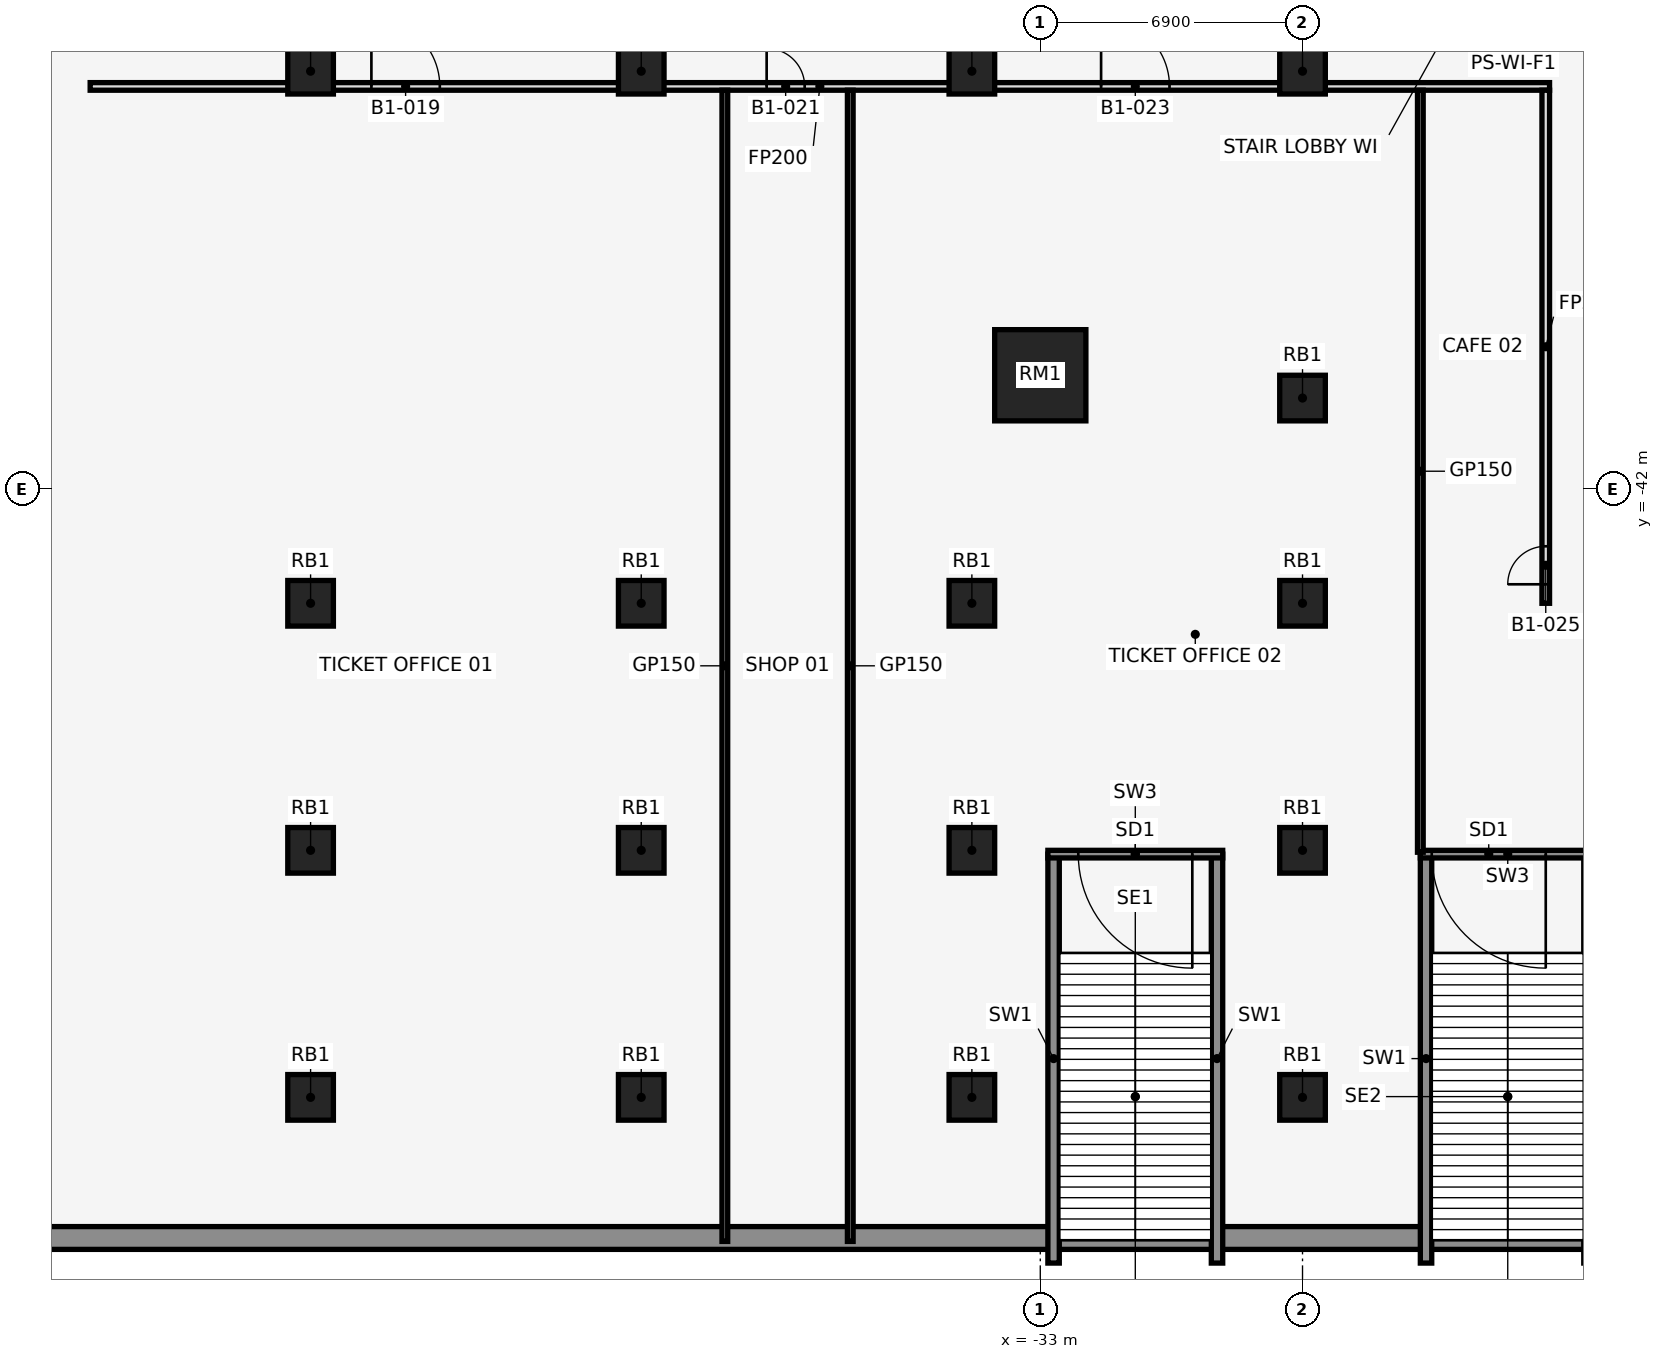
"""IFC4 building model, lengths in metres.
Left out: names, types, materials, properties, quantities, classifications, styles, units other than length and angle.
Written with IfcOpenShell. Run it as: python <this file> out.ifc"""

import sys

from ifc_helpers import new_model, si_unit, direction, frame, frame_2d, origin, origin_2d, place, context, subcontext, project, spatial, polyline, rectangle, outline, extrude, element, fill, save


model = new_model("IFC4")
c1 = context("Model", 3, precision=1e-05, world=origin(), true_north=direction((0.0, 1.0)))
c2 = subcontext(c1, "Body", "Model", "MODEL_VIEW")
j1 = project(units=[si_unit("LENGTHUNIT", "METRE"), si_unit("PLANEANGLEUNIT", "RADIAN")], contexts=[c1])
p1 = place(None, origin())
s1 = spatial("IfcSite", under=j1, at=p1, CompositionType="ELEMENT")
p2 = place(p1, origin())
s2 = spatial("IfcBuilding", under=s1, at=p2, CompositionType="ELEMENT")
p3 = place(p2, frame((0.0, 0.0, -5.0)))
s3 = spatial("IfcBuildingStorey", under=s2, at=p3, CompositionType="ELEMENT", Elevation=-5.0)
p4 = place(p3, frame((-33.0, -39.0, 0.0), z_axis=(0.0, 0.0, 1.0), x_axis=(1.0, 0.0, 0.0)))
e1 = element("IfcColumn", 1, at=p4, inside=s3, PredefinedType="COLUMN", context=c2, shape_type="SweptSolid", body=[
    extrude(rectangle(XDim=2.4, YDim=2.4, at=origin_2d()), origin(), (0.0, 0.0, 1.0), 5.0),
])
for number, where, z_axis, x_axis in (
    (2, (-26.1, -39.6, 0.0), (0.0, 0.0, 1.0), (1.0, 0.0, 0.0)),
    (3, (-52.2, -31.0, 0.0), (0.0, 0.0, 1.0), (1.0, 0.0, 0.0)),
    (4, (-52.2, -45.0, 0.0), (0.0, 0.0, 1.0), (1.0, 0.0, 0.0)),
    (5, (-52.2, -51.5, 0.0), (0.0, 0.0, 1.0), (1.0, 0.0, 0.0)),
    (6, (-52.2, -58.0, 0.0), (0.0, 0.0, 1.0), (1.0, 0.0, 0.0)),
    (7, (-43.5, -31.0, 0.0), (0.0, 0.0, 1.0), (1.0, 0.0, 0.0)),
    (8, (-43.5, -45.0, 0.0), (0.0, 0.0, 1.0), (1.0, 0.0, 0.0)),
    (9, (-43.5, -51.5, 0.0), (0.0, 0.0, 1.0), (1.0, 0.0, 0.0)),
    (10, (-43.5, -58.0, 0.0), (0.0, 0.0, 1.0), (1.0, 0.0, 0.0)),
    (11, (-34.8, -31.0, 0.0), (0.0, 0.0, 1.0), (1.0, 0.0, 0.0)),
    (12, (-34.8, -45.0, 0.0), (0.0, 0.0, 1.0), (1.0, 0.0, 0.0)),
    (13, (-34.8, -51.5, 0.0), (0.0, 0.0, 1.0), (1.0, 0.0, 0.0)),
    (14, (-34.8, -58.0, 0.0), (0.0, 0.0, 1.0), (1.0, 0.0, 0.0)),
    (15, (-26.1, -31.0, 0.0), (0.0, 0.0, 1.0), (1.0, 0.0, 0.0)),
    (16, (-26.1, -45.0, 0.0), (0.0, 0.0, 1.0), (1.0, 0.0, 0.0)),
    (17, (-26.1, -51.5, 0.0), (0.0, 0.0, 1.0), (1.0, 0.0, 0.0)),
    (18, (-26.1, -58.0, 0.0), (0.0, 0.0, 1.0), (1.0, 0.0, 0.0)),
):
    element("IfcColumn", number, at=place(p3, frame(where, z_axis=z_axis, x_axis=x_axis)), inside=s3, PredefinedType="COLUMN", context=c2, shape_type="SweptSolid", body=[
        extrude(rectangle(XDim=1.2, YDim=1.2, at=origin_2d()), origin(), (0.0, 0.0, 1.0), 5.0),
    ])
p5 = place(p3, frame((-60.0, -61.7, 0.0), z_axis=(0.0, 0.0, 1.0), x_axis=(1.0, 0.0, 0.0)))
e19 = element("IfcWall", 19, at=p5, inside=s3, PredefinedType="SOLIDWALL", context=c2, shape_type="SweptSolid", body=[
    extrude(rectangle(XDim=120.0, YDim=0.6, at=frame_2d((60.0, 0.0))), origin(), (0.0, 0.0, 1.0), 5.0),
])
for number, where, z_axis, x_axis in (
    (20, (-32.65, -51.6, 0.0), (0.0, 0.0, 1.0), (0.0, -1.0, 0.0)),
    (21, (-28.35, -51.6, 0.0), (0.0, 0.0, 1.0), (0.0, -1.0, 0.0)),
):
    element("IfcWall", number, at=place(p3, frame(where, z_axis=z_axis, x_axis=x_axis)), inside=s3, PredefinedType="STANDARD", context=c2, shape_type="SweptSolid", body=[
        extrude(outline(polyline([(0.0, 0.0), (10.76, 0.0), (10.76, 6.1), (10.16, 6.1), (2.6, 1.1), (0.0, 1.1), (0.0, 0.0)])), frame((0.0, 0.15, 0.0), z_axis=(0.0, -1.0, 0.0), x_axis=(1.0, 0.0, 0.0)), (0.0, 0.0, 1.0), 0.3),
    ])
p6 = place(p3, frame((-28.2, -51.6, 0.0), z_axis=(0.0, 0.0, 1.0), x_axis=(-1.0, 0.0, 0.0)))
e22 = element("IfcWall", 22, at=p6, inside=s3, PredefinedType="STANDARD", context=c2, shape_type="SweptSolid", body=[
    extrude(rectangle(XDim=4.6, YDim=0.2, at=frame_2d((2.3, 0.0))), origin(), (0.0, 0.0, 1.0), 4.75),
])
p7 = place(p6, frame((0.8, 0.0, 0.0)))
e23 = element("IfcOpeningElement", 23, at=p7, cuts=e22, PredefinedType="OPENING", context=c2, shape_type="SweptSolid", body=[
    extrude(rectangle(XDim=3.0, YDim=2.4, at=frame_2d((1.5, 1.2))), frame((0.0, 0.112, 0.0), z_axis=(0.0, -1.0, 0.0), x_axis=(1.0, 0.0, 0.0)), (0.0, 0.0, 1.0), 0.224),
])
for number, where, z_axis, x_axis in (
    (24, (-22.85, -51.6, 0.0), (0.0, 0.0, 1.0), (0.0, -1.0, 0.0)),
    (25, (-18.55, -51.6, 0.0), (0.0, 0.0, 1.0), (0.0, -1.0, 0.0)),
):
    element("IfcWall", number, at=place(p3, frame(where, z_axis=z_axis, x_axis=x_axis)), inside=s3, PredefinedType="STANDARD", context=c2, shape_type="SweptSolid", body=[
        extrude(outline(polyline([(0.0, 0.0), (10.76, 0.0), (10.76, 6.1), (10.16, 6.1), (2.6, 1.1), (0.0, 1.1), (0.0, 0.0)])), frame((0.0, 0.15, 0.0), z_axis=(0.0, -1.0, 0.0), x_axis=(1.0, 0.0, 0.0)), (0.0, 0.0, 1.0), 0.3),
    ])
p8 = place(p3, frame((-18.4, -51.6, 0.0), z_axis=(0.0, 0.0, 1.0), x_axis=(-1.0, 0.0, 0.0)))
e26 = element("IfcWall", 26, at=p8, inside=s3, PredefinedType="STANDARD", context=c2, shape_type="SweptSolid", body=[
    extrude(rectangle(XDim=4.6, YDim=0.2, at=frame_2d((2.3, 0.0))), origin(), (0.0, 0.0, 1.0), 4.75),
])
p9 = place(p8, frame((1.3, 0.0, 0.0)))
e27 = element("IfcOpeningElement", 27, at=p9, cuts=e26, PredefinedType="OPENING", context=c2, shape_type="SweptSolid", body=[
    extrude(rectangle(XDim=3.0, YDim=2.4, at=frame_2d((1.5, 1.2))), frame((0.0, 0.112, 0.0), z_axis=(0.0, -1.0, 0.0), x_axis=(1.0, 0.0, 0.0)), (0.0, 0.0, 1.0), 0.224),
])
p10 = place(p3, frame((-58.0, -31.4, 0.0), z_axis=(0.0, 0.0, 1.0), x_axis=(1.0, 0.0, 0.0)))
e28 = element("IfcWall", 28, at=p10, inside=s3, PredefinedType="PARTITIONING", context=c2, shape_type="SweptSolid", body=[
    extrude(rectangle(XDim=38.4, YDim=0.2, at=frame_2d((19.2, 0.0))), origin(), (0.0, 0.0, 1.0), 4.7),
])
p11 = place(p10, frame((7.4, 0.0, 0.0)))
e29 = element("IfcOpeningElement", 29, at=p11, cuts=e28, PredefinedType="OPENING", context=c2, shape_type="SweptSolid", body=[
    extrude(rectangle(XDim=1.8, YDim=2.1, at=frame_2d((0.9, 1.05))), frame((0.0, 0.112, 0.0), z_axis=(0.0, -1.0, 0.0), x_axis=(1.0, 0.0, 0.0)), (0.0, 0.0, 1.0), 0.224),
])
p12 = place(p10, frame((17.8, 0.0, 0.0)))
e30 = element("IfcOpeningElement", 30, at=p12, cuts=e28, PredefinedType="OPENING", context=c2, shape_type="SweptSolid", body=[
    extrude(rectangle(XDim=1.0, YDim=2.1, at=frame_2d((0.5, 1.05))), frame((0.0, 0.112, 0.0), z_axis=(0.0, -1.0, 0.0), x_axis=(1.0, 0.0, 0.0)), (0.0, 0.0, 1.0), 0.224),
])
p13 = place(p10, frame((26.6, 0.0, 0.0)))
e31 = element("IfcOpeningElement", 31, at=p13, cuts=e28, PredefinedType="OPENING", context=c2, shape_type="SweptSolid", body=[
    extrude(rectangle(XDim=1.8, YDim=2.1, at=frame_2d((0.9, 1.05))), frame((0.0, 0.112, 0.0), z_axis=(0.0, -1.0, 0.0), x_axis=(1.0, 0.0, 0.0)), (0.0, 0.0, 1.0), 0.224),
])
for number, where, z_axis, x_axis in (
    (32, (-41.3, -61.79, 0.0), (0.0, 0.0, 1.0), (0.0, 1.0, 0.0)),
    (33, (-38.0, -61.79, 0.0), (0.0, 0.0, 1.0), (0.0, 1.0, 0.0)),
):
    element("IfcWall", number, at=place(p3, frame(where, z_axis=z_axis, x_axis=x_axis)), inside=s3, PredefinedType="PARTITIONING", context=c2, shape_type="SweptSolid", body=[
        extrude(rectangle(XDim=30.29, YDim=0.15, at=frame_2d((15.145, 0.0))), origin(), (0.0, 0.0, 1.0), 4.7),
    ])
p14 = place(p3, frame((-23.0, -51.55, 0.0), z_axis=(0.0, 0.0, 1.0), x_axis=(0.0, 1.0, 0.0)))
e34 = element("IfcWall", 34, at=p14, inside=s3, PredefinedType="PARTITIONING", context=c2, shape_type="SweptSolid", body=[
    extrude(rectangle(XDim=20.05, YDim=0.15, at=frame_2d((10.025, 0.0))), origin(), (0.0, 0.0, 1.0), 4.7),
])
p15 = place(p3, frame((-19.7, -45.0, 0.0), z_axis=(0.0, 0.0, 1.0), x_axis=(0.0, 1.0, 0.0)))
e35 = element("IfcWall", 35, at=p15, inside=s3, PredefinedType="PARTITIONING", context=c2, shape_type="SweptSolid", body=[
    extrude(rectangle(XDim=13.5, YDim=0.2, at=frame_2d((6.75, 0.0))), origin(), (0.0, 0.0, 1.0), 4.7),
])
p16 = place(p15, frame((0.5, 0.0, 0.0)))
e36 = element("IfcOpeningElement", 36, at=p16, cuts=e35, PredefinedType="OPENING", context=c2, shape_type="SweptSolid", body=[
    extrude(rectangle(XDim=1.0, YDim=2.1, at=frame_2d((0.5, 1.05))), frame((0.0, 0.112, 0.0), z_axis=(0.0, -1.0, 0.0), x_axis=(1.0, 0.0, 0.0)), (0.0, 0.0, 1.0), 0.224),
])
p17 = place(p7, origin())
e37 = element("IfcDoor", 37, at=p17, inside=s3, OperationType="SINGLE_SWING_LEFT", PredefinedType="DOOR", context=c2, shape_type="SweptSolid", body=[
    extrude(rectangle(XDim=3.0, YDim=2.4, at=frame_2d((1.5, 1.2))), frame((0.0, 0.025, 0.0), z_axis=(0.0, -1.0, 0.0), x_axis=(1.0, 0.0, 0.0)), (0.0, 0.0, 1.0), 0.05),
])
fill(e23, e37)
p18 = place(p9, origin())
e38 = element("IfcDoor", 38, at=p18, inside=s3, OperationType="SINGLE_SWING_LEFT", PredefinedType="DOOR", context=c2, shape_type="SweptSolid", body=[
    extrude(rectangle(XDim=3.0, YDim=2.4, at=frame_2d((1.5, 1.2))), frame((0.0, 0.025, 0.0), z_axis=(0.0, -1.0, 0.0), x_axis=(1.0, 0.0, 0.0)), (0.0, 0.0, 1.0), 0.05),
])
fill(e27, e38)
p19 = place(p11, origin())
e39 = element("IfcDoor", 39, at=p19, inside=s3, OperationType="SINGLE_SWING_LEFT", PredefinedType="DOOR", context=c2, shape_type="SweptSolid", body=[
    extrude(rectangle(XDim=1.8, YDim=2.1, at=frame_2d((0.9, 1.05))), frame((0.0, 0.025, 0.0), z_axis=(0.0, -1.0, 0.0), x_axis=(1.0, 0.0, 0.0)), (0.0, 0.0, 1.0), 0.05),
])
fill(e29, e39)
p20 = place(p12, frame((1.0, 0.0, 0.0), z_axis=(0.0, 0.0, 1.0), x_axis=(-1.0, 0.0, 0.0)))
e40 = element("IfcDoor", 40, at=p20, inside=s3, OperationType="SINGLE_SWING_RIGHT", PredefinedType="DOOR", context=c2, shape_type="SweptSolid", body=[
    extrude(rectangle(XDim=1.0, YDim=2.1, at=frame_2d((0.5, 1.05))), frame((0.0, 0.025, 0.0), z_axis=(0.0, -1.0, 0.0), x_axis=(1.0, 0.0, 0.0)), (0.0, 0.0, 1.0), 0.05),
])
fill(e30, e40)
p21 = place(p13, origin())
e41 = element("IfcDoor", 41, at=p21, inside=s3, OperationType="SINGLE_SWING_LEFT", PredefinedType="DOOR", context=c2, shape_type="SweptSolid", body=[
    extrude(rectangle(XDim=1.8, YDim=2.1, at=frame_2d((0.9, 1.05))), frame((0.0, 0.025, 0.0), z_axis=(0.0, -1.0, 0.0), x_axis=(1.0, 0.0, 0.0)), (0.0, 0.0, 1.0), 0.05),
])
fill(e31, e41)
p22 = place(p16, origin())
e42 = element("IfcDoor", 42, at=p22, inside=s3, OperationType="SINGLE_SWING_LEFT", PredefinedType="DOOR", context=c2, shape_type="SweptSolid", body=[
    extrude(rectangle(XDim=1.0, YDim=2.1, at=frame_2d((0.5, 1.05))), frame((0.0, 0.025, 0.0), z_axis=(0.0, -1.0, 0.0), x_axis=(1.0, 0.0, 0.0)), (0.0, 0.0, 1.0), 0.05),
])
fill(e36, e42)
save(model, sys.argv[1])
